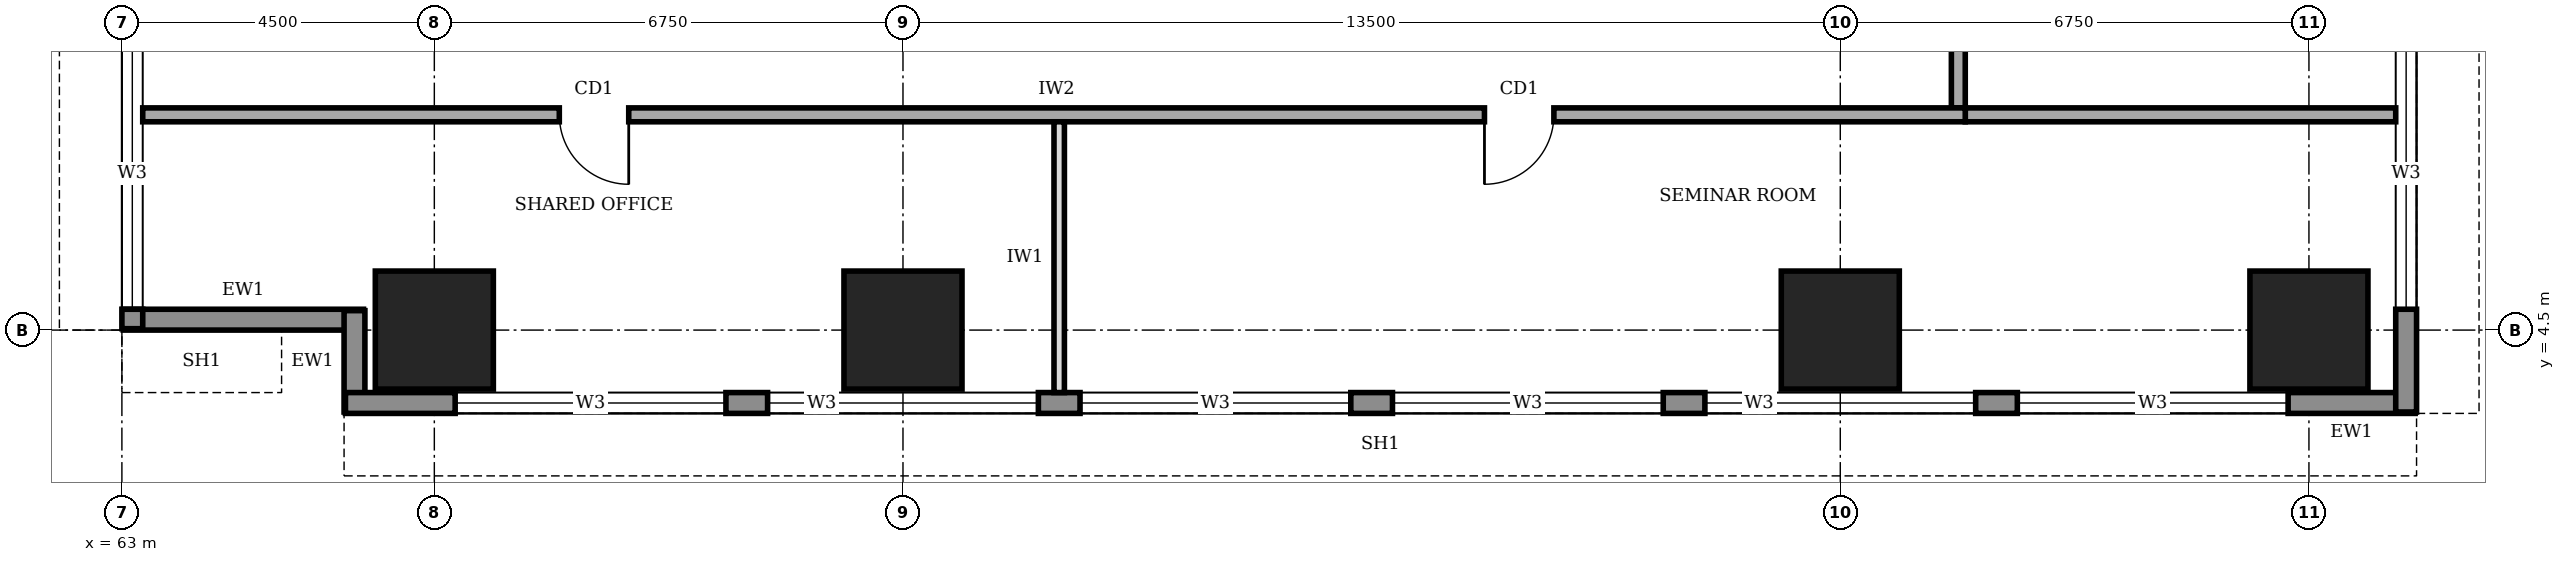
"""IFC4 building model, lengths in metres.
Left out: names, types, materials, properties, quantities, classifications, styles, units other than length and angle.
Written with IfcOpenShell. Run it as: python <this file> out.ifc"""

import sys

from ifc_helpers import new_model, si_unit, direction, frame, frame_2d, origin, origin_2d, place, context, subcontext, project, spatial, rectangle, extrude, element, fill, save


model = new_model("IFC4")
c1 = context("Model", 3, precision=1e-05, world=origin(), true_north=direction((0.0, 1.0)))
c2 = subcontext(c1, "Body", "Model", "MODEL_VIEW")
j1 = project(units=[si_unit("LENGTHUNIT", "METRE"), si_unit("PLANEANGLEUNIT", "RADIAN")], contexts=[c1])
p1 = place(None, origin())
s1 = spatial("IfcSite", under=j1, at=p1, CompositionType="ELEMENT")
p2 = place(p1, origin())
s2 = spatial("IfcBuilding", under=s1, at=p2, CompositionType="ELEMENT")
p3 = place(p2, frame((0.0, 0.0, 89.0)))
s3 = spatial("IfcBuildingStorey", under=s2, at=p3, CompositionType="ELEMENT", Elevation=89.0)
for number, where, z_axis, x_axis in (
    (1, (67.5, 4.5, 0.0), (0.0, 0.0, 1.0), (1.0, 0.0, 0.0)),
    (2, (74.25, 4.5, 0.0), (0.0, 0.0, 1.0), (1.0, 0.0, 0.0)),
    (3, (87.75, 4.5, 0.0), (0.0, 0.0, 1.0), (1.0, 0.0, 0.0)),
    (4, (94.5, 4.5, 0.0), (0.0, 0.0, 1.0), (1.0, 0.0, 0.0)),
):
    element("IfcColumn", number, at=place(p3, frame(where, z_axis=z_axis, x_axis=x_axis)), inside=s3, PredefinedType="COLUMN", context=c2, shape_type="SweptSolid", body=[
        extrude(rectangle(XDim=1.7, YDim=1.7, at=origin_2d()), origin(), (0.0, 0.0, 1.0), 4.0),
    ])
p4 = place(p3, frame((63.02, 4.65, 0.0), z_axis=(0.0, 0.0, 1.0), x_axis=(1.0, 0.0, 0.0)))
e5 = element("IfcWall", 5, at=p4, inside=s3, PredefinedType="STANDARD", context=c2, shape_type="SweptSolid", body=[
    extrude(rectangle(XDim=3.46, YDim=0.3, at=frame_2d((1.73, 0.0))), origin(), (0.0, 0.0, 1.0), 2.85),
])
p5 = place(p3, frame((66.35, 4.78, 0.0), z_axis=(0.0, 0.0, 1.0), x_axis=(0.0, -1.0, 0.0)))
e6 = element("IfcWall", 6, at=p5, inside=s3, PredefinedType="STANDARD", context=c2, shape_type="SweptSolid", body=[
    extrude(rectangle(XDim=1.46, YDim=0.3, at=frame_2d((0.73, 0.0))), origin(), (0.0, 0.0, 1.0), 3.75),
])
p6 = place(p3, frame((66.22, 3.45, 0.0), z_axis=(0.0, 0.0, 1.0), x_axis=(1.0, 0.0, 0.0)))
e7 = element("IfcWall", 7, at=p6, inside=s3, PredefinedType="STANDARD", context=c2, shape_type="SweptSolid", body=[
    extrude(rectangle(XDim=29.81, YDim=0.3, at=frame_2d((14.905, 0.0))), origin(), (0.0, 0.0, 1.0), 3.75),
])
p7 = place(p6, frame((1.58, 0.0, 0.95)))
e8 = element("IfcOpeningElement", 8, at=p7, cuts=e7, PredefinedType="OPENING", context=c2, shape_type="SweptSolid", body=[
    extrude(rectangle(XDim=3.9, YDim=1.8, at=frame_2d((1.95, 0.9))), frame((0.0, 0.16, 0.0), z_axis=(0.0, -1.0, 0.0), x_axis=(1.0, 0.0, 0.0)), (0.0, 0.0, 1.0), 0.32),
])
p8 = place(p6, frame((6.08, 0.0, 0.95)))
e9 = element("IfcOpeningElement", 9, at=p8, cuts=e7, PredefinedType="OPENING", context=c2, shape_type="SweptSolid", body=[
    extrude(rectangle(XDim=3.9, YDim=1.8, at=frame_2d((1.95, 0.9))), frame((0.0, 0.16, 0.0), z_axis=(0.0, -1.0, 0.0), x_axis=(1.0, 0.0, 0.0)), (0.0, 0.0, 1.0), 0.32),
])
p9 = place(p6, frame((10.58, 0.0, 0.95)))
e10 = element("IfcOpeningElement", 10, at=p9, cuts=e7, PredefinedType="OPENING", context=c2, shape_type="SweptSolid", body=[
    extrude(rectangle(XDim=3.9, YDim=1.8, at=frame_2d((1.95, 0.9))), frame((0.0, 0.16, 0.0), z_axis=(0.0, -1.0, 0.0), x_axis=(1.0, 0.0, 0.0)), (0.0, 0.0, 1.0), 0.32),
])
p10 = place(p6, frame((15.08, 0.0, 0.95)))
e11 = element("IfcOpeningElement", 11, at=p10, cuts=e7, PredefinedType="OPENING", context=c2, shape_type="SweptSolid", body=[
    extrude(rectangle(XDim=3.9, YDim=1.8, at=frame_2d((1.95, 0.9))), frame((0.0, 0.16, 0.0), z_axis=(0.0, -1.0, 0.0), x_axis=(1.0, 0.0, 0.0)), (0.0, 0.0, 1.0), 0.32),
])
p11 = place(p6, frame((19.58, 0.0, 0.95)))
e12 = element("IfcOpeningElement", 12, at=p11, cuts=e7, PredefinedType="OPENING", context=c2, shape_type="SweptSolid", body=[
    extrude(rectangle(XDim=3.9, YDim=1.8, at=frame_2d((1.95, 0.9))), frame((0.0, 0.16, 0.0), z_axis=(0.0, -1.0, 0.0), x_axis=(1.0, 0.0, 0.0)), (0.0, 0.0, 1.0), 0.32),
])
p12 = place(p6, frame((24.08, 0.0, 0.95)))
e13 = element("IfcOpeningElement", 13, at=p12, cuts=e7, PredefinedType="OPENING", context=c2, shape_type="SweptSolid", body=[
    extrude(rectangle(XDim=3.9, YDim=1.8, at=frame_2d((1.95, 0.9))), frame((0.0, 0.16, 0.0), z_axis=(0.0, -1.0, 0.0), x_axis=(1.0, 0.0, 0.0)), (0.0, 0.0, 1.0), 0.32),
])
p13 = place(p3, frame((95.9, 3.32, 0.0), z_axis=(0.0, 0.0, 1.0), x_axis=(0.0, 1.0, 0.0)))
e14 = element("IfcWall", 14, at=p13, inside=s3, PredefinedType="STANDARD", context=c2, shape_type="SweptSolid", body=[
    extrude(rectangle(XDim=33.96, YDim=0.3, at=frame_2d((16.98, 0.0))), origin(), (0.0, 0.0, 1.0), 3.75),
])
p14 = place(p13, frame((1.48, 0.0, 0.95)))
e15 = element("IfcOpeningElement", 15, at=p14, cuts=e14, PredefinedType="OPENING", context=c2, shape_type="SweptSolid", body=[
    extrude(rectangle(XDim=3.9, YDim=1.8, at=frame_2d((1.95, 0.9))), frame((0.0, 0.16, 0.0), z_axis=(0.0, -1.0, 0.0), x_axis=(1.0, 0.0, 0.0)), (0.0, 0.0, 1.0), 0.32),
])
p15 = place(p13, frame((5.98, 0.0, 0.95)))
e16 = element("IfcOpeningElement", 16, at=p15, cuts=e14, PredefinedType="OPENING", context=c2, shape_type="SweptSolid", body=[
    extrude(rectangle(XDim=3.9, YDim=1.8, at=frame_2d((1.95, 0.9))), frame((0.0, 0.16, 0.0), z_axis=(0.0, -1.0, 0.0), x_axis=(1.0, 0.0, 0.0)), (0.0, 0.0, 1.0), 0.32),
])
p16 = place(p13, frame((10.48, 0.0, 0.95)))
e17 = element("IfcOpeningElement", 17, at=p16, cuts=e14, PredefinedType="OPENING", context=c2, shape_type="SweptSolid", body=[
    extrude(rectangle(XDim=3.9, YDim=1.8, at=frame_2d((1.95, 0.9))), frame((0.0, 0.16, 0.0), z_axis=(0.0, -1.0, 0.0), x_axis=(1.0, 0.0, 0.0)), (0.0, 0.0, 1.0), 0.32),
])
p17 = place(p13, frame((14.98, 0.0, 0.95)))
e18 = element("IfcOpeningElement", 18, at=p17, cuts=e14, PredefinedType="OPENING", context=c2, shape_type="SweptSolid", body=[
    extrude(rectangle(XDim=3.9, YDim=1.8, at=frame_2d((1.95, 0.9))), frame((0.0, 0.16, 0.0), z_axis=(0.0, -1.0, 0.0), x_axis=(1.0, 0.0, 0.0)), (0.0, 0.0, 1.0), 0.32),
])
p18 = place(p13, frame((19.48, 0.0, 0.95)))
e19 = element("IfcOpeningElement", 19, at=p18, cuts=e14, PredefinedType="OPENING", context=c2, shape_type="SweptSolid", body=[
    extrude(rectangle(XDim=3.9, YDim=1.8, at=frame_2d((1.95, 0.9))), frame((0.0, 0.16, 0.0), z_axis=(0.0, -1.0, 0.0), x_axis=(1.0, 0.0, 0.0)), (0.0, 0.0, 1.0), 0.32),
])
p19 = place(p13, frame((23.98, 0.0, 0.95)))
e20 = element("IfcOpeningElement", 20, at=p19, cuts=e14, PredefinedType="OPENING", context=c2, shape_type="SweptSolid", body=[
    extrude(rectangle(XDim=3.9, YDim=1.8, at=frame_2d((1.95, 0.9))), frame((0.0, 0.16, 0.0), z_axis=(0.0, -1.0, 0.0), x_axis=(1.0, 0.0, 0.0)), (0.0, 0.0, 1.0), 0.32),
])
p20 = place(p13, frame((28.48, 0.0, 0.95)))
e21 = element("IfcOpeningElement", 21, at=p20, cuts=e14, PredefinedType="OPENING", context=c2, shape_type="SweptSolid", body=[
    extrude(rectangle(XDim=3.9, YDim=1.8, at=frame_2d((1.95, 0.9))), frame((0.0, 0.16, 0.0), z_axis=(0.0, -1.0, 0.0), x_axis=(1.0, 0.0, 0.0)), (0.0, 0.0, 1.0), 0.32),
])
p21 = place(p3, frame((63.15, 35.98, 0.0), z_axis=(0.0, 0.0, 1.0), x_axis=(0.0, -1.0, 0.0)))
e22 = element("IfcWall", 22, at=p21, inside=s3, PredefinedType="STANDARD", context=c2, shape_type="SweptSolid", body=[
    extrude(rectangle(XDim=31.46, YDim=0.3, at=frame_2d((15.73, 0.0))), origin(), (0.0, 0.0, 1.0), 3.75),
])
p22 = place(p21, frame((27.28, 0.0, 0.95)))
e23 = element("IfcOpeningElement", 23, at=p22, cuts=e22, PredefinedType="OPENING", context=c2, shape_type="SweptSolid", body=[
    extrude(rectangle(XDim=3.9, YDim=1.8, at=frame_2d((1.95, 0.9))), frame((0.0, 0.16, 0.0), z_axis=(0.0, -1.0, 0.0), x_axis=(1.0, 0.0, 0.0)), (0.0, 0.0, 1.0), 0.32),
])
p23 = place(p21, frame((22.78, 0.0, 0.95)))
e24 = element("IfcOpeningElement", 24, at=p23, cuts=e22, PredefinedType="OPENING", context=c2, shape_type="SweptSolid", body=[
    extrude(rectangle(XDim=3.9, YDim=1.8, at=frame_2d((1.95, 0.9))), frame((0.0, 0.16, 0.0), z_axis=(0.0, -1.0, 0.0), x_axis=(1.0, 0.0, 0.0)), (0.0, 0.0, 1.0), 0.32),
])
p24 = place(p21, frame((18.28, 0.0, 0.95)))
e25 = element("IfcOpeningElement", 25, at=p24, cuts=e22, PredefinedType="OPENING", context=c2, shape_type="SweptSolid", body=[
    extrude(rectangle(XDim=3.9, YDim=1.8, at=frame_2d((1.95, 0.9))), frame((0.0, 0.16, 0.0), z_axis=(0.0, -1.0, 0.0), x_axis=(1.0, 0.0, 0.0)), (0.0, 0.0, 1.0), 0.32),
])
p25 = place(p21, frame((13.78, 0.0, 0.95)))
e26 = element("IfcOpeningElement", 26, at=p25, cuts=e22, PredefinedType="OPENING", context=c2, shape_type="SweptSolid", body=[
    extrude(rectangle(XDim=3.9, YDim=1.8, at=frame_2d((1.95, 0.9))), frame((0.0, 0.16, 0.0), z_axis=(0.0, -1.0, 0.0), x_axis=(1.0, 0.0, 0.0)), (0.0, 0.0, 1.0), 0.32),
])
p26 = place(p21, frame((9.28, 0.0, 0.95)))
e27 = element("IfcOpeningElement", 27, at=p26, cuts=e22, PredefinedType="OPENING", context=c2, shape_type="SweptSolid", body=[
    extrude(rectangle(XDim=3.9, YDim=1.8, at=frame_2d((1.95, 0.9))), frame((0.0, 0.16, 0.0), z_axis=(0.0, -1.0, 0.0), x_axis=(1.0, 0.0, 0.0)), (0.0, 0.0, 1.0), 0.32),
])
p27 = place(p21, frame((4.78, 0.0, 0.95)))
e28 = element("IfcOpeningElement", 28, at=p27, cuts=e22, PredefinedType="OPENING", context=c2, shape_type="SweptSolid", body=[
    extrude(rectangle(XDim=3.9, YDim=1.8, at=frame_2d((1.95, 0.9))), frame((0.0, 0.16, 0.0), z_axis=(0.0, -1.0, 0.0), x_axis=(1.0, 0.0, 0.0)), (0.0, 0.0, 1.0), 0.32),
])
p28 = place(p3, frame((63.3, 7.6, 0.0), z_axis=(0.0, 0.0, 1.0), x_axis=(1.0, 0.0, 0.0)))
e29 = element("IfcWall", 29, at=p28, inside=s3, PredefinedType="SOLIDWALL", context=c2, shape_type="SweptSolid", body=[
    extrude(rectangle(XDim=26.25, YDim=0.2, at=frame_2d((13.125, 0.0))), origin(), (0.0, 0.0, 1.0), 3.75),
])
p29 = place(p28, frame((6.0, 0.0, 0.0)))
e30 = element("IfcOpeningElement", 30, at=p29, cuts=e29, PredefinedType="OPENING", context=c2, shape_type="SweptSolid", body=[
    extrude(rectangle(XDim=1.0, YDim=2.1, at=frame_2d((0.5, 1.05))), frame((0.0, 0.11, 0.0), z_axis=(0.0, -1.0, 0.0), x_axis=(1.0, 0.0, 0.0)), (0.0, 0.0, 1.0), 0.22),
])
p30 = place(p28, frame((19.325, 0.0, 0.0)))
e31 = element("IfcOpeningElement", 31, at=p30, cuts=e29, PredefinedType="OPENING", context=c2, shape_type="SweptSolid", body=[
    extrude(rectangle(XDim=1.0, YDim=2.1, at=frame_2d((0.5, 1.05))), frame((0.0, 0.11, 0.0), z_axis=(0.0, -1.0, 0.0), x_axis=(1.0, 0.0, 0.0)), (0.0, 0.0, 1.0), 0.22),
])
p31 = place(p3, frame((89.45, 7.7, 0.0), z_axis=(0.0, 0.0, 1.0), x_axis=(0.0, 1.0, 0.0)))
e32 = element("IfcWall", 32, at=p31, inside=s3, PredefinedType="SOLIDWALL", context=c2, shape_type="SweptSolid", body=[
    extrude(rectangle(XDim=25.3, YDim=0.2, at=frame_2d((12.65, 0.0))), origin(), (0.0, 0.0, 1.0), 3.75),
])
p32 = place(p31, frame((2.3, 0.0, 0.0)))
e33 = element("IfcOpeningElement", 33, at=p32, cuts=e32, PredefinedType="OPENING", context=c2, shape_type="SweptSolid", body=[
    extrude(rectangle(XDim=1.0, YDim=2.1, at=frame_2d((0.5, 1.05))), frame((0.0, 0.11, 0.0), z_axis=(0.0, -1.0, 0.0), x_axis=(1.0, 0.0, 0.0)), (0.0, 0.0, 1.0), 0.22),
])
p33 = place(p31, frame((6.4, 0.0, 0.0)))
e34 = element("IfcOpeningElement", 34, at=p33, cuts=e32, PredefinedType="OPENING", context=c2, shape_type="SweptSolid", body=[
    extrude(rectangle(XDim=1.0, YDim=2.1, at=frame_2d((0.5, 1.05))), frame((0.0, 0.11, 0.0), z_axis=(0.0, -1.0, 0.0), x_axis=(1.0, 0.0, 0.0)), (0.0, 0.0, 1.0), 0.22),
])
p34 = place(p31, frame((9.5, 0.0, 0.0)))
e35 = element("IfcOpeningElement", 35, at=p34, cuts=e32, PredefinedType="OPENING", context=c2, shape_type="SweptSolid", body=[
    extrude(rectangle(XDim=0.9, YDim=2.1, at=frame_2d((0.45, 1.05))), frame((0.0, 0.11, 0.0), z_axis=(0.0, -1.0, 0.0), x_axis=(1.0, 0.0, 0.0)), (0.0, 0.0, 1.0), 0.22),
])
p35 = place(p31, frame((12.55, 0.0, 0.0)))
e36 = element("IfcOpeningElement", 36, at=p35, cuts=e32, PredefinedType="OPENING", context=c2, shape_type="SweptSolid", body=[
    extrude(rectangle(XDim=0.9, YDim=2.1, at=frame_2d((0.45, 1.05))), frame((0.0, 0.11, 0.0), z_axis=(0.0, -1.0, 0.0), x_axis=(1.0, 0.0, 0.0)), (0.0, 0.0, 1.0), 0.22),
])
p36 = place(p31, frame((17.25, 0.0, 0.0)))
e37 = element("IfcOpeningElement", 37, at=p36, cuts=e32, PredefinedType="OPENING", context=c2, shape_type="SweptSolid", body=[
    extrude(rectangle(XDim=0.9, YDim=2.1, at=frame_2d((0.45, 1.05))), frame((0.0, 0.11, 0.0), z_axis=(0.0, -1.0, 0.0), x_axis=(1.0, 0.0, 0.0)), (0.0, 0.0, 1.0), 0.22),
])
p37 = place(p31, frame((14.6, 0.0, 0.0)))
e38 = element("IfcOpeningElement", 38, at=p37, cuts=e32, PredefinedType="OPENING", context=c2, shape_type="SweptSolid", body=[
    extrude(rectangle(XDim=1.0, YDim=2.1, at=frame_2d((0.5, 1.05))), frame((0.0, 0.11, 0.0), z_axis=(0.0, -1.0, 0.0), x_axis=(1.0, 0.0, 0.0)), (0.0, 0.0, 1.0), 0.22),
])
p38 = place(p31, frame((21.8, 0.0, 0.0)))
e39 = element("IfcOpeningElement", 39, at=p38, cuts=e32, PredefinedType="OPENING", context=c2, shape_type="SweptSolid", body=[
    extrude(rectangle(XDim=1.0, YDim=2.1, at=frame_2d((0.5, 1.05))), frame((0.0, 0.11, 0.0), z_axis=(0.0, -1.0, 0.0), x_axis=(1.0, 0.0, 0.0)), (0.0, 0.0, 1.0), 0.22),
])
p39 = place(p3, frame((89.55, 7.6, 0.0), z_axis=(0.0, 0.0, 1.0), x_axis=(1.0, 0.0, 0.0)))
e40 = element("IfcWall", 40, at=p39, inside=s3, PredefinedType="SOLIDWALL", context=c2, shape_type="SweptSolid", body=[
    extrude(rectangle(XDim=6.2, YDim=0.2, at=frame_2d((3.1, 0.0))), origin(), (0.0, 0.0, 1.0), 3.75),
])
p40 = place(p3, frame((76.5, 3.6, 0.0), z_axis=(0.0, 0.0, 1.0), x_axis=(0.0, 1.0, 0.0)))
e41 = element("IfcWall", 41, at=p40, inside=s3, PredefinedType="PARTITIONING", context=c2, shape_type="SweptSolid", body=[
    extrude(rectangle(XDim=3.9, YDim=0.15, at=frame_2d((1.95, 0.0))), origin(), (0.0, 0.0, 1.0), 3.75),
])
p41 = place(p7, origin())
e42 = element("IfcWindow", 42, at=p41, inside=s3, PartitioningType="SINGLE_PANEL", PredefinedType="WINDOW", context=c2, shape_type="SweptSolid", body=[
    extrude(rectangle(XDim=3.9, YDim=1.8, at=frame_2d((1.95, 0.9))), frame((0.0, 0.03, 0.0), z_axis=(0.0, -1.0, 0.0), x_axis=(1.0, 0.0, 0.0)), (0.0, 0.0, 1.0), 0.06),
])
fill(e8, e42)
p42 = place(p8, origin())
e43 = element("IfcWindow", 43, at=p42, inside=s3, PartitioningType="SINGLE_PANEL", PredefinedType="WINDOW", context=c2, shape_type="SweptSolid", body=[
    extrude(rectangle(XDim=3.9, YDim=1.8, at=frame_2d((1.95, 0.9))), frame((0.0, 0.03, 0.0), z_axis=(0.0, -1.0, 0.0), x_axis=(1.0, 0.0, 0.0)), (0.0, 0.0, 1.0), 0.06),
])
fill(e9, e43)
p43 = place(p9, origin())
e44 = element("IfcWindow", 44, at=p43, inside=s3, PartitioningType="SINGLE_PANEL", PredefinedType="WINDOW", context=c2, shape_type="SweptSolid", body=[
    extrude(rectangle(XDim=3.9, YDim=1.8, at=frame_2d((1.95, 0.9))), frame((0.0, 0.03, 0.0), z_axis=(0.0, -1.0, 0.0), x_axis=(1.0, 0.0, 0.0)), (0.0, 0.0, 1.0), 0.06),
])
fill(e10, e44)
p44 = place(p10, origin())
e45 = element("IfcWindow", 45, at=p44, inside=s3, PartitioningType="SINGLE_PANEL", PredefinedType="WINDOW", context=c2, shape_type="SweptSolid", body=[
    extrude(rectangle(XDim=3.9, YDim=1.8, at=frame_2d((1.95, 0.9))), frame((0.0, 0.03, 0.0), z_axis=(0.0, -1.0, 0.0), x_axis=(1.0, 0.0, 0.0)), (0.0, 0.0, 1.0), 0.06),
])
fill(e11, e45)
p45 = place(p11, origin())
e46 = element("IfcWindow", 46, at=p45, inside=s3, PartitioningType="SINGLE_PANEL", PredefinedType="WINDOW", context=c2, shape_type="SweptSolid", body=[
    extrude(rectangle(XDim=3.9, YDim=1.8, at=frame_2d((1.95, 0.9))), frame((0.0, 0.03, 0.0), z_axis=(0.0, -1.0, 0.0), x_axis=(1.0, 0.0, 0.0)), (0.0, 0.0, 1.0), 0.06),
])
fill(e12, e46)
p46 = place(p12, origin())
e47 = element("IfcWindow", 47, at=p46, inside=s3, PartitioningType="SINGLE_PANEL", PredefinedType="WINDOW", context=c2, shape_type="SweptSolid", body=[
    extrude(rectangle(XDim=3.9, YDim=1.8, at=frame_2d((1.95, 0.9))), frame((0.0, 0.03, 0.0), z_axis=(0.0, -1.0, 0.0), x_axis=(1.0, 0.0, 0.0)), (0.0, 0.0, 1.0), 0.06),
])
fill(e13, e47)
p47 = place(p14, origin())
e48 = element("IfcWindow", 48, at=p47, inside=s3, PartitioningType="SINGLE_PANEL", PredefinedType="WINDOW", context=c2, shape_type="SweptSolid", body=[
    extrude(rectangle(XDim=3.9, YDim=1.8, at=frame_2d((1.95, 0.9))), frame((0.0, 0.03, 0.0), z_axis=(0.0, -1.0, 0.0), x_axis=(1.0, 0.0, 0.0)), (0.0, 0.0, 1.0), 0.06),
])
fill(e15, e48)
p48 = place(p22, origin())
e49 = element("IfcWindow", 49, at=p48, inside=s3, PartitioningType="SINGLE_PANEL", PredefinedType="WINDOW", context=c2, shape_type="SweptSolid", body=[
    extrude(rectangle(XDim=3.9, YDim=1.8, at=frame_2d((1.95, 0.9))), frame((0.0, 0.03, 0.0), z_axis=(0.0, -1.0, 0.0), x_axis=(1.0, 0.0, 0.0)), (0.0, 0.0, 1.0), 0.06),
])
fill(e23, e49)
p49 = place(p29, frame((1.0, 0.0, 0.0), z_axis=(0.0, 0.0, 1.0), x_axis=(-1.0, 0.0, 0.0)))
e50 = element("IfcDoor", 50, at=p49, inside=s3, OperationType="SINGLE_SWING_LEFT", PredefinedType="DOOR", context=c2, shape_type="SweptSolid", body=[
    extrude(rectangle(XDim=1.0, YDim=2.1, at=frame_2d((0.5, 1.05))), frame((0.0, 0.025, 0.0), z_axis=(0.0, -1.0, 0.0), x_axis=(1.0, 0.0, 0.0)), (0.0, 0.0, 1.0), 0.05),
])
fill(e30, e50)
p50 = place(p30, frame((1.0, 0.0, 0.0), z_axis=(0.0, 0.0, 1.0), x_axis=(-1.0, 0.0, 0.0)))
e51 = element("IfcDoor", 51, at=p50, inside=s3, OperationType="SINGLE_SWING_RIGHT", PredefinedType="DOOR", context=c2, shape_type="SweptSolid", body=[
    extrude(rectangle(XDim=1.0, YDim=2.1, at=frame_2d((0.5, 1.05))), frame((0.0, 0.025, 0.0), z_axis=(0.0, -1.0, 0.0), x_axis=(1.0, 0.0, 0.0)), (0.0, 0.0, 1.0), 0.05),
])
fill(e31, e51)
save(model, sys.argv[1])
